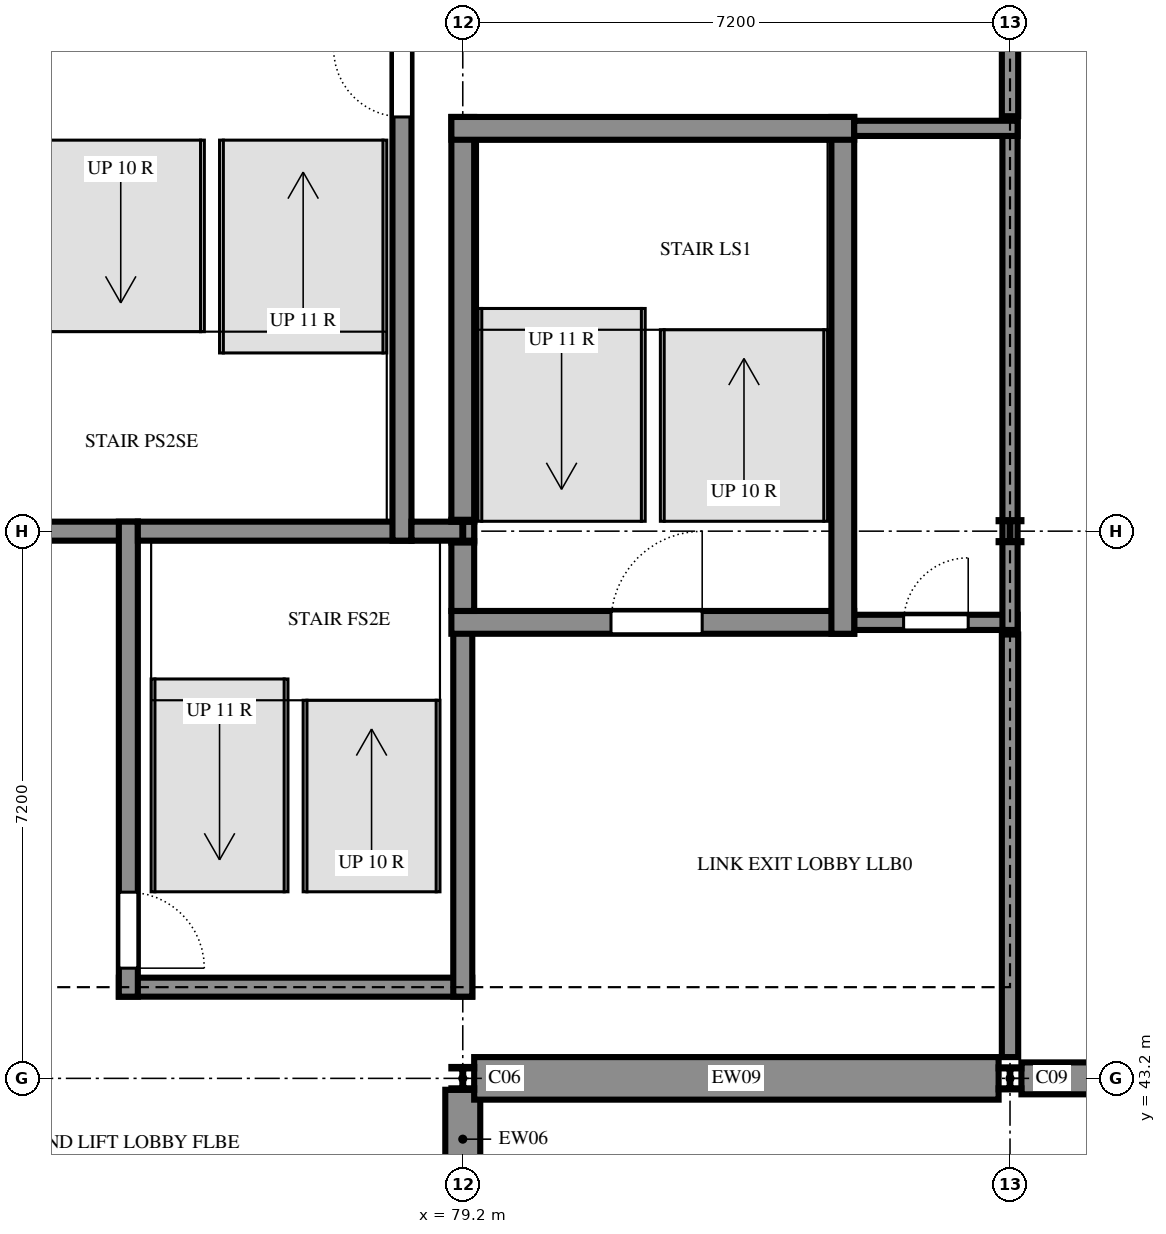
"""IFC4 building model, lengths in metres.
Left out: names, types, materials, properties, quantities, classifications, styles, units other than length and angle.
Written with IfcOpenShell. Run it as: python <this file> out.ifc"""

import sys

from ifc_helpers import new_model, si_unit, direction, frame, frame_2d, origin, origin_2d, place, context, subcontext, project, spatial, rectangle, i_section, extrude, element, fill, save


model = new_model("IFC4")
c1 = context("Model", 3, precision=1e-05, world=origin(), true_north=direction((0.0, 1.0)))
c2 = subcontext(c1, "Body", "Model", "MODEL_VIEW")
j1 = project(units=[si_unit("LENGTHUNIT", "METRE"), si_unit("PLANEANGLEUNIT", "RADIAN")], contexts=[c1])
p1 = place(None, origin())
s1 = spatial("IfcSite", under=j1, at=p1, CompositionType="ELEMENT")
p2 = place(p1, origin())
s2 = spatial("IfcBuilding", under=s1, at=p2, CompositionType="ELEMENT")
p3 = place(p2, frame((0.0, 0.0, 10.8)))
s3 = spatial("IfcBuildingStorey", under=s2, at=p3, CompositionType="ELEMENT", Elevation=10.8)
for number, where, z_axis, x_axis in (
    (1, (79.2, 43.2, 0.0), (0.0, 0.0, 1.0), (1.0, 0.0, 0.0)),
    (2, (79.2, 50.4, 0.0), (0.0, 0.0, 1.0), (1.0, 0.0, 0.0)),
):
    element("IfcColumn", number, at=place(p3, frame(where, z_axis=z_axis, x_axis=x_axis)), inside=s3, PredefinedType="COLUMN", context=c2, shape_type="SweptSolid", body=[
        extrude(i_section(OverallWidth=0.3, OverallDepth=0.3, WebThickness=0.011, FlangeThickness=0.019, FilletRadius=0.027, at=origin_2d()), origin(), (0.0, 0.0, 1.0), 3.6),
    ])
for number, where, z_axis, x_axis in (
    (3, (86.4, 43.2, 0.0), (0.0, 0.0, 1.0), (1.0, 0.0, 0.0)),
    (4, (86.4, 50.4, 0.0), (0.0, 0.0, 1.0), (1.0, 0.0, 0.0)),
):
    element("IfcColumn", number, at=place(p3, frame(where, z_axis=z_axis, x_axis=x_axis)), inside=s3, PredefinedType="COLUMN", context=c2, shape_type="SweptSolid", body=[
        extrude(i_section(OverallWidth=0.3, OverallDepth=0.29, WebThickness=0.009, FlangeThickness=0.014, FilletRadius=0.027, at=origin_2d()), origin(), (0.0, 0.0, 1.0), 3.6),
    ])
p4 = place(p3, frame((74.675, 44.4, 0.0), z_axis=(0.0, 0.0, 1.0), x_axis=(1.0, 0.0, 0.0)))
e5 = element("IfcWall", 5, at=p4, inside=s3, PredefinedType="SHEAR", context=c2, shape_type="SweptSolid", body=[
    extrude(rectangle(XDim=4.65, YDim=0.25, at=frame_2d((2.325, 0.0))), origin(), (0.0, 0.0, 1.0), 3.6),
])
p5 = place(p3, frame((79.2, 44.275, 0.0), z_axis=(0.0, 0.0, 1.0), x_axis=(0.0, 1.0, 0.0)))
e6 = element("IfcWall", 6, at=p5, inside=s3, PredefinedType="SHEAR", context=c2, shape_type="SweptSolid", body=[
    extrude(rectangle(XDim=5.075, YDim=0.25, at=frame_2d((2.538, 0.0))), origin(), (0.0, 0.0, 1.0), 3.6),
])
p6 = place(p3, frame((79.05, 49.2, 0.0), z_axis=(0.0, 0.0, 1.0), x_axis=(1.0, 0.0, 0.0)))
e7 = element("IfcWall", 7, at=p6, inside=s3, PredefinedType="SHEAR", context=c2, shape_type="SweptSolid", body=[
    extrude(rectangle(XDim=5.3, YDim=0.3, at=frame_2d((2.65, 0.0))), origin(), (0.0, 0.0, 1.0), 3.6),
])
p7 = place(p6, frame((2.1, 0.0, 0.0)))
e8 = element("IfcOpeningElement", 8, at=p7, cuts=e7, PredefinedType="OPENING", context=c2, shape_type="SweptSolid", body=[
    extrude(rectangle(XDim=1.2, YDim=2.4, at=frame_2d((0.6, 1.2))), frame((0.0, 0.16, 0.0), z_axis=(0.0, -1.0, 0.0), x_axis=(1.0, 0.0, 0.0)), (0.0, 0.0, 1.0), 0.32),
])
p8 = place(p3, frame((79.2, 49.35, 0.0), z_axis=(0.0, 0.0, 1.0), x_axis=(0.0, 1.0, 0.0)))
e9 = element("IfcWall", 9, at=p8, inside=s3, PredefinedType="SHEAR", context=c2, shape_type="SweptSolid", body=[
    extrude(rectangle(XDim=1.175, YDim=0.3, at=frame_2d((0.587, 0.0))), origin(), (0.0, 0.0, 1.0), 3.6),
])
p9 = place(p3, frame((84.35, 49.2, 0.0), z_axis=(0.0, 0.0, 1.0), x_axis=(1.0, 0.0, 0.0)))
e10 = element("IfcWall", 10, at=p9, inside=s3, PredefinedType="SHEAR", context=c2, shape_type="SweptSolid", body=[
    extrude(rectangle(XDim=2.15, YDim=0.2, at=frame_2d((1.075, 0.0))), origin(), (0.0, 0.0, 1.0), 3.6),
])
p10 = place(p9, frame((0.65, 0.0, 0.0)))
e11 = element("IfcOpeningElement", 11, at=p10, cuts=e10, PredefinedType="OPENING", context=c2, shape_type="SweptSolid", body=[
    extrude(rectangle(XDim=0.85, YDim=2.1, at=frame_2d((0.425, 1.05))), frame((0.0, 0.11, 0.0), z_axis=(0.0, -1.0, 0.0), x_axis=(1.0, 0.0, 0.0)), (0.0, 0.0, 1.0), 0.22),
])
p11 = place(p3, frame((84.2, 49.05, 0.0), z_axis=(0.0, 0.0, 1.0), x_axis=(0.0, 1.0, 0.0)))
e12 = element("IfcWall", 12, at=p11, inside=s3, PredefinedType="SHEAR", context=c2, shape_type="SweptSolid", body=[
    extrude(rectangle(XDim=6.8, YDim=0.3, at=frame_2d((3.4, 0.0))), origin(), (0.0, 0.0, 1.0), 3.6),
])
p12 = place(p3, frame((86.4, 49.1, 0.0), z_axis=(0.0, 0.0, 1.0), x_axis=(0.0, 1.0, 0.0)))
e13 = element("IfcWall", 13, at=p12, inside=s3, PredefinedType="SHEAR", context=c2, shape_type="SweptSolid", body=[
    extrude(rectangle(XDim=6.7, YDim=0.2, at=frame_2d((3.35, 0.0))), origin(), (0.0, 0.0, 1.0), 3.6),
])
p13 = place(p3, frame((73.525, 50.4, 0.0), z_axis=(0.0, 0.0, 1.0), x_axis=(1.0, 0.0, 0.0)))
e14 = element("IfcWall", 14, at=p13, inside=s3, PredefinedType="SHEAR", context=c2, shape_type="SweptSolid", body=[
    extrude(rectangle(XDim=1.4, YDim=0.25, at=frame_2d((0.7, 0.0))), origin(), (0.0, 0.0, 1.0), 3.6),
])
p14 = place(p3, frame((74.8, 50.525, 0.0), z_axis=(0.0, 0.0, 1.0), x_axis=(0.0, -1.0, 0.0)))
e15 = element("IfcWall", 15, at=p14, inside=s3, PredefinedType="SHEAR", context=c2, shape_type="SweptSolid", body=[
    extrude(rectangle(XDim=6.25, YDim=0.25, at=frame_2d((3.125, 0.0))), origin(), (0.0, 0.0, 1.0), 3.6),
])
p15 = place(p14, frame((4.875, 0.0, 0.0)))
e16 = element("IfcOpeningElement", 16, at=p15, cuts=e15, PredefinedType="OPENING", context=c2, shape_type="SweptSolid", body=[
    extrude(rectangle(XDim=1.0, YDim=2.4, at=frame_2d((0.5, 1.2))), frame((0.0, 0.135, 0.0), z_axis=(0.0, -1.0, 0.0), x_axis=(1.0, 0.0, 0.0)), (0.0, 0.0, 1.0), 0.27),
])
p16 = place(p3, frame((78.525, 50.4, 0.0), z_axis=(0.0, 0.0, 1.0), x_axis=(-1.0, 0.0, 0.0)))
e17 = element("IfcWall", 17, at=p16, inside=s3, PredefinedType="SHEAR", context=c2, shape_type="SweptSolid", body=[
    extrude(rectangle(XDim=3.6, YDim=0.25, at=frame_2d((1.8, 0.0))), origin(), (0.0, 0.0, 1.0), 3.6),
])
p17 = place(p3, frame((78.4, 50.275, 0.0), z_axis=(0.0, 0.0, 1.0), x_axis=(0.0, 1.0, 0.0)))
e18 = element("IfcWall", 18, at=p17, inside=s3, PredefinedType="SHEAR", context=c2, shape_type="SweptSolid", body=[
    extrude(rectangle(XDim=6.75, YDim=0.25, at=frame_2d((3.375, 0.0))), origin(), (0.0, 0.0, 1.0), 3.6),
])
p18 = place(p17, frame((5.575, 0.0, 0.0)))
e19 = element("IfcOpeningElement", 19, at=p18, cuts=e18, PredefinedType="OPENING", context=c2, shape_type="SweptSolid", body=[
    extrude(rectangle(XDim=0.9, YDim=2.1, at=frame_2d((0.45, 1.05))), frame((0.0, 0.135, 0.0), z_axis=(0.0, -1.0, 0.0), x_axis=(1.0, 0.0, 0.0)), (0.0, 0.0, 1.0), 0.27),
])
p19 = place(p3, frame((79.35, 50.4, 0.0), z_axis=(0.0, 0.0, 1.0), x_axis=(-1.0, 0.0, 0.0)))
e20 = element("IfcWall", 20, at=p19, inside=s3, PredefinedType="SHEAR", context=c2, shape_type="SweptSolid", body=[
    extrude(rectangle(XDim=0.825, YDim=0.25, at=frame_2d((0.413, 0.0))), origin(), (0.0, 0.0, 1.0), 3.6),
])
p20 = place(p3, frame((79.2, 55.85, 0.0), z_axis=(0.0, 0.0, 1.0), x_axis=(0.0, -1.0, 0.0)))
e21 = element("IfcWall", 21, at=p20, inside=s3, PredefinedType="SHEAR", context=c2, shape_type="SweptSolid", body=[
    extrude(rectangle(XDim=5.325, YDim=0.3, at=frame_2d((2.663, 0.0))), origin(), (0.0, 0.0, 1.0), 3.6),
])
p21 = place(p3, frame((84.35, 55.7, 0.0), z_axis=(0.0, 0.0, 1.0), x_axis=(-1.0, 0.0, 0.0)))
e22 = element("IfcWall", 22, at=p21, inside=s3, PredefinedType="SHEAR", context=c2, shape_type="SweptSolid", body=[
    extrude(rectangle(XDim=5.3, YDim=0.3, at=frame_2d((2.65, 0.0))), origin(), (0.0, 0.0, 1.0), 3.6),
])
p22 = place(p3, frame((86.5, 55.7, 0.0), z_axis=(0.0, 0.0, 1.0), x_axis=(-1.0, 0.0, 0.0)))
e23 = element("IfcWall", 23, at=p22, inside=s3, PredefinedType="SHEAR", context=c2, shape_type="SweptSolid", body=[
    extrude(rectangle(XDim=2.15, YDim=0.2, at=frame_2d((1.075, 0.0))), origin(), (0.0, 0.0, 1.0), 3.6),
])
p23 = place(p3, frame((79.2, 41.75, 0.0), z_axis=(0.0, 0.0, 1.0), x_axis=(0.0, 1.0, 0.0)))
e24 = element("IfcWall", 24, at=p23, inside=s3, PredefinedType="SOLIDWALL", context=c2, shape_type="SweptSolid", body=[
    extrude(rectangle(XDim=1.3, YDim=0.46, at=frame_2d((0.65, 0.0))), origin(), (0.0, 0.0, 1.0), 3.22),
])
p24 = place(p3, frame((86.55, 43.2, 0.0), z_axis=(0.0, 0.0, 1.0), x_axis=(1.0, 0.0, 0.0)))
e25 = element("IfcWall", 25, at=p24, inside=s3, PredefinedType="SOLIDWALL", context=c2, shape_type="SweptSolid", body=[
    extrude(rectangle(XDim=6.9, YDim=0.42, at=frame_2d((3.45, 0.0))), origin(), (0.0, 0.0, 1.0), 3.6),
])
p25 = place(p24, frame((1.65, 0.0, 1.2)))
e26 = element("IfcOpeningElement", 26, at=p25, cuts=e25, PredefinedType="OPENING", context=c2, shape_type="SweptSolid", body=[
    extrude(rectangle(XDim=3.6, YDim=1.2, at=frame_2d((1.8, 0.6))), frame((0.0, 0.22, 0.0), z_axis=(0.0, -1.0, 0.0), x_axis=(1.0, 0.0, 0.0)), (0.0, 0.0, 1.0), 0.44),
])
p26 = place(p3, frame((79.35, 43.2, 0.0), z_axis=(0.0, 0.0, 1.0), x_axis=(1.0, 0.0, 0.0)))
e27 = element("IfcWall", 27, at=p26, inside=s3, PredefinedType="SOLIDWALL", context=c2, shape_type="SweptSolid", body=[
    extrude(rectangle(XDim=6.9, YDim=0.56, at=frame_2d((3.45, 0.0))), origin(), (0.0, 0.0, 1.0), 3.12),
])
p27 = place(p3, frame((86.4, 43.48, 0.0), z_axis=(0.0, 0.0, 1.0), x_axis=(0.0, 1.0, 0.0)))
e28 = element("IfcWall", 28, at=p27, inside=s3, PredefinedType="PARTITIONING", context=c2, shape_type="SweptSolid", body=[
    extrude(rectangle(XDim=5.56, YDim=0.215, at=frame_2d((2.78, 0.0))), origin(), (0.0, 0.0, 1.0), 3.15),
])
p28 = place(p3, frame((86.4, 55.86, 0.0), z_axis=(0.0, 0.0, 1.0), x_axis=(0.0, 1.0, 0.0)))
e29 = element("IfcWall", 29, at=p28, inside=s3, PredefinedType="PARTITIONING", context=c2, shape_type="SweptSolid", body=[
    extrude(rectangle(XDim=1.985, YDim=0.215, at=frame_2d((0.992, 0.0))), origin(), (0.0, 0.0, 1.0), 3.6),
])
p29 = place(p15, origin())
e30 = element("IfcDoor", 30, at=p29, inside=s3, OperationType="SINGLE_SWING_LEFT", PredefinedType="DOOR", context=c2, shape_type="SweptSolid", body=[
    extrude(rectangle(XDim=1.0, YDim=2.4, at=frame_2d((0.5, 1.2))), frame((0.0, 0.025, 0.0), z_axis=(0.0, -1.0, 0.0), x_axis=(1.0, 0.0, 0.0)), (0.0, 0.0, 1.0), 0.05),
])
fill(e16, e30)
p30 = place(p18, origin())
e31 = element("IfcDoor", 31, at=p30, inside=s3, OperationType="SINGLE_SWING_LEFT", PredefinedType="DOOR", context=c2, shape_type="SweptSolid", body=[
    extrude(rectangle(XDim=0.9, YDim=2.1, at=frame_2d((0.45, 1.05))), frame((0.0, 0.025, 0.0), z_axis=(0.0, -1.0, 0.0), x_axis=(1.0, 0.0, 0.0)), (0.0, 0.0, 1.0), 0.05),
])
fill(e19, e31)
p31 = place(p7, origin())
e32 = element("IfcDoor", 32, at=p31, inside=s3, OperationType="SINGLE_SWING_LEFT", PredefinedType="DOOR", context=c2, shape_type="SweptSolid", body=[
    extrude(rectangle(XDim=1.2, YDim=2.4, at=frame_2d((0.6, 1.2))), frame((0.0, 0.025, 0.0), z_axis=(0.0, -1.0, 0.0), x_axis=(1.0, 0.0, 0.0)), (0.0, 0.0, 1.0), 0.05),
])
fill(e8, e32)
p32 = place(p10, origin())
e33 = element("IfcDoor", 33, at=p32, inside=s3, OperationType="SINGLE_SWING_LEFT", PredefinedType="DOOR", context=c2, shape_type="SweptSolid", body=[
    extrude(rectangle(XDim=0.85, YDim=2.1, at=frame_2d((0.425, 1.05))), frame((0.0, 0.025, 0.0), z_axis=(0.0, -1.0, 0.0), x_axis=(1.0, 0.0, 0.0)), (0.0, 0.0, 1.0), 0.05),
])
fill(e11, e33)
save(model, sys.argv[1])
